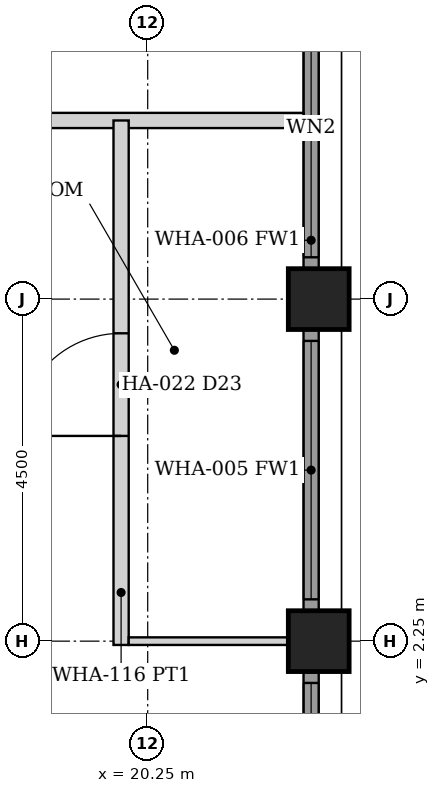
"""IFC4 building model, lengths in metres.
Left out: names, types, materials, properties, quantities, classifications, styles, units other than length and angle.
Written with IfcOpenShell. Run it as: python <this file> out.ifc"""

import sys

from ifc_helpers import new_model, si_unit, direction, frame, frame_2d, origin, origin_2d, place, context, subcontext, project, spatial, rectangle, hollow_rectangle, extrude, element, fill, save


model = new_model("IFC4")
c1 = context("Model", 3, precision=1e-05, world=origin(), true_north=direction((0.0, 1.0)))
c2 = subcontext(c1, "Body", "Model", "MODEL_VIEW")
j1 = project(units=[si_unit("LENGTHUNIT", "METRE"), si_unit("PLANEANGLEUNIT", "RADIAN")], contexts=[c1])
p1 = place(None, origin())
s1 = spatial("IfcSite", under=j1, at=p1, CompositionType="ELEMENT")
p2 = place(p1, origin())
s2 = spatial("IfcBuilding", under=s1, at=p2, CompositionType="ELEMENT")
p3 = place(p2, frame((0.0, 0.0, 118.4)))
s3 = spatial("IfcBuildingStorey", under=s2, at=p3, CompositionType="ELEMENT", Elevation=118.4)
for number, where, z_axis, x_axis in (
    (1, (22.5, 2.25, 0.0), (0.0, 0.0, 1.0), (1.0, 0.0, 0.0)),
    (2, (22.5, 6.75, 0.0), (0.0, 0.0, 1.0), (1.0, 0.0, 0.0)),
):
    element("IfcColumn", number, at=place(p3, frame(where, z_axis=z_axis, x_axis=x_axis)), inside=s3, PredefinedType="COLUMN", context=c2, shape_type="SweptSolid", body=[
        extrude(hollow_rectangle(XDim=0.8, YDim=0.8, WallThickness=0.06, at=origin_2d()), origin(), (0.0, 0.0, 1.0), 3.6),
    ])
p4 = place(p3, frame((22.4, -1.845, 0.0), z_axis=(0.0, 0.0, 1.0), x_axis=(0.0, 1.0, 0.0)))
e3 = element("IfcWall", 3, at=p4, inside=s3, PredefinedType="SOLIDWALL", context=c2, shape_type="SweptSolid", body=[
    extrude(rectangle(XDim=3.69, YDim=0.2, at=frame_2d((1.845, 0.0))), origin(), (0.0, 0.0, 1.0), 2.479),
])
p5 = place(p4, frame((0.145, 0.0, 0.3)))
e4 = element("IfcOpeningElement", 4, at=p5, cuts=e3, PredefinedType="OPENING", context=c2, shape_type="SweptSolid", body=[
    extrude(rectangle(XDim=3.4, YDim=2.029, at=frame_2d((1.7, 1.015))), frame((0.0, 0.11, 0.0), z_axis=(0.0, -1.0, 0.0), x_axis=(1.0, 0.0, 0.0)), (0.0, 0.0, 1.0), 0.22),
])
p6 = place(p3, frame((22.4, 2.655, 0.0), z_axis=(0.0, 0.0, 1.0), x_axis=(0.0, 1.0, 0.0)))
e5 = element("IfcWall", 5, at=p6, inside=s3, PredefinedType="SOLIDWALL", context=c2, shape_type="SweptSolid", body=[
    extrude(rectangle(XDim=3.69, YDim=0.2, at=frame_2d((1.845, 0.0))), origin(), (0.0, 0.0, 1.0), 2.479),
])
p7 = place(p6, frame((0.145, 0.0, 0.3)))
e6 = element("IfcOpeningElement", 6, at=p7, cuts=e5, PredefinedType="OPENING", context=c2, shape_type="SweptSolid", body=[
    extrude(rectangle(XDim=3.4, YDim=2.029, at=frame_2d((1.7, 1.015))), frame((0.0, 0.11, 0.0), z_axis=(0.0, -1.0, 0.0), x_axis=(1.0, 0.0, 0.0)), (0.0, 0.0, 1.0), 0.22),
])
p8 = place(p3, frame((22.4, 7.155, 0.0), z_axis=(0.0, 0.0, 1.0), x_axis=(0.0, 1.0, 0.0)))
e7 = element("IfcWall", 7, at=p8, inside=s3, PredefinedType="SOLIDWALL", context=c2, shape_type="SweptSolid", body=[
    extrude(rectangle(XDim=3.69, YDim=0.2, at=frame_2d((1.845, 0.0))), origin(), (0.0, 0.0, 1.0), 2.479),
])
p9 = place(p8, frame((0.145, 0.0, 0.3)))
e8 = element("IfcOpeningElement", 8, at=p9, cuts=e7, PredefinedType="OPENING", context=c2, shape_type="SweptSolid", body=[
    extrude(rectangle(XDim=3.4, YDim=2.029, at=frame_2d((1.7, 1.015))), frame((0.0, 0.11, 0.0), z_axis=(0.0, -1.0, 0.0), x_axis=(1.0, 0.0, 0.0)), (0.0, 0.0, 1.0), 0.22),
])
p10 = place(p3, frame((-22.3, 9.1, 0.0), z_axis=(0.0, 0.0, 1.0), x_axis=(1.0, 0.0, 0.0)))
e9 = element("IfcWall", 9, at=p10, inside=s3, PredefinedType="PARTITIONING", context=c2, shape_type="SweptSolid", body=[
    extrude(rectangle(XDim=44.6, YDim=0.2, at=frame_2d((22.3, 0.0))), origin(), (0.0, 0.0, 1.0), 2.473),
])
p11 = place(p10, frame((6.75, 0.0, 0.0)))
e10 = element("IfcOpeningElement", 10, at=p11, cuts=e9, PredefinedType="OPENING", context=c2, shape_type="SweptSolid", body=[
    extrude(rectangle(XDim=0.9, YDim=2.1, at=frame_2d((0.45, 1.05))), frame((0.0, 0.11, 0.0), z_axis=(0.0, -1.0, 0.0), x_axis=(1.0, 0.0, 0.0)), (0.0, 0.0, 1.0), 0.22),
])
p12 = place(p10, frame((11.25, 0.0, 0.0)))
e11 = element("IfcOpeningElement", 11, at=p12, cuts=e9, PredefinedType="OPENING", context=c2, shape_type="SweptSolid", body=[
    extrude(rectangle(XDim=0.9, YDim=2.1, at=frame_2d((0.45, 1.05))), frame((0.0, 0.11, 0.0), z_axis=(0.0, -1.0, 0.0), x_axis=(1.0, 0.0, 0.0)), (0.0, 0.0, 1.0), 0.22),
])
p13 = place(p10, frame((15.75, 0.0, 0.0)))
e12 = element("IfcOpeningElement", 12, at=p13, cuts=e9, PredefinedType="OPENING", context=c2, shape_type="SweptSolid", body=[
    extrude(rectangle(XDim=0.9, YDim=2.1, at=frame_2d((0.45, 1.05))), frame((0.0, 0.11, 0.0), z_axis=(0.0, -1.0, 0.0), x_axis=(1.0, 0.0, 0.0)), (0.0, 0.0, 1.0), 0.22),
])
p14 = place(p10, frame((20.25, 0.0, 0.0)))
e13 = element("IfcOpeningElement", 13, at=p14, cuts=e9, PredefinedType="OPENING", context=c2, shape_type="SweptSolid", body=[
    extrude(rectangle(XDim=0.9, YDim=2.1, at=frame_2d((0.45, 1.05))), frame((0.0, 0.11, 0.0), z_axis=(0.0, -1.0, 0.0), x_axis=(1.0, 0.0, 0.0)), (0.0, 0.0, 1.0), 0.22),
])
p15 = place(p10, frame((24.75, 0.0, 0.0)))
e14 = element("IfcOpeningElement", 14, at=p15, cuts=e9, PredefinedType="OPENING", context=c2, shape_type="SweptSolid", body=[
    extrude(rectangle(XDim=0.9, YDim=2.1, at=frame_2d((0.45, 1.05))), frame((0.0, 0.11, 0.0), z_axis=(0.0, -1.0, 0.0), x_axis=(1.0, 0.0, 0.0)), (0.0, 0.0, 1.0), 0.22),
])
p16 = place(p10, frame((29.25, 0.0, 0.0)))
e15 = element("IfcOpeningElement", 15, at=p16, cuts=e9, PredefinedType="OPENING", context=c2, shape_type="SweptSolid", body=[
    extrude(rectangle(XDim=0.9, YDim=2.1, at=frame_2d((0.45, 1.05))), frame((0.0, 0.11, 0.0), z_axis=(0.0, -1.0, 0.0), x_axis=(1.0, 0.0, 0.0)), (0.0, 0.0, 1.0), 0.22),
])
p17 = place(p10, frame((33.75, 0.0, 0.0)))
e16 = element("IfcOpeningElement", 16, at=p17, cuts=e9, PredefinedType="OPENING", context=c2, shape_type="SweptSolid", body=[
    extrude(rectangle(XDim=0.9, YDim=2.1, at=frame_2d((0.45, 1.05))), frame((0.0, 0.11, 0.0), z_axis=(0.0, -1.0, 0.0), x_axis=(1.0, 0.0, 0.0)), (0.0, 0.0, 1.0), 0.22),
])
p18 = place(p10, frame((38.85, 0.0, 0.0)))
e17 = element("IfcOpeningElement", 17, at=p18, cuts=e9, PredefinedType="OPENING", context=c2, shape_type="SweptSolid", body=[
    extrude(rectangle(XDim=0.9, YDim=2.1, at=frame_2d((0.45, 1.05))), frame((0.0, 0.11, 0.0), z_axis=(0.0, -1.0, 0.0), x_axis=(1.0, 0.0, 0.0)), (0.0, 0.0, 1.0), 0.22),
])
p19 = place(p10, frame((4.85, 0.0, 0.0)))
e18 = element("IfcOpeningElement", 18, at=p19, cuts=e9, PredefinedType="OPENING", context=c2, shape_type="SweptSolid", body=[
    extrude(rectangle(XDim=0.9, YDim=2.1, at=frame_2d((0.45, 1.05))), frame((0.0, 0.11, 0.0), z_axis=(0.0, -1.0, 0.0), x_axis=(1.0, 0.0, 0.0)), (0.0, 0.0, 1.0), 0.22),
])
p20 = place(p3, frame((19.9, 2.2, 0.0), z_axis=(0.0, 0.0, 1.0), x_axis=(0.0, 1.0, 0.0)))
e19 = element("IfcWall", 19, at=p20, inside=s3, PredefinedType="PARTITIONING", context=c2, shape_type="SweptSolid", body=[
    extrude(rectangle(XDim=6.9, YDim=0.2, at=frame_2d((3.45, 0.0))), origin(), (0.0, 0.0, 1.0), 2.473),
])
p21 = place(p20, frame((2.75, 0.0, 0.0)))
e20 = element("IfcOpeningElement", 20, at=p21, cuts=e19, PredefinedType="OPENING", context=c2, shape_type="SweptSolid", body=[
    extrude(rectangle(XDim=1.35, YDim=2.1, at=frame_2d((0.675, 1.05))), frame((0.0, 0.11, 0.0), z_axis=(0.0, -1.0, 0.0), x_axis=(1.0, 0.0, 0.0)), (0.0, 0.0, 1.0), 0.22),
])
p22 = place(p3, frame((20.0, 2.25, 0.0), z_axis=(0.0, 0.0, 1.0), x_axis=(1.0, 0.0, 0.0)))
e21 = element("IfcWall", 21, at=p22, inside=s3, PredefinedType="PARTITIONING", context=c2, shape_type="SweptSolid", body=[
    extrude(rectangle(XDim=2.1, YDim=0.1, at=frame_2d((1.05, 0.0))), origin(), (0.0, 0.0, 1.0), 2.473),
])
p23 = place(p5, origin())
e22 = element("IfcWindow", 22, at=p23, inside=s3, PartitioningType="SINGLE_PANEL", PredefinedType="WINDOW", context=c2, shape_type="SweptSolid", body=[
    extrude(rectangle(XDim=3.4, YDim=2.029, at=frame_2d((1.7, 1.015))), frame((0.0, 0.03, 0.0), z_axis=(0.0, -1.0, 0.0), x_axis=(1.0, 0.0, 0.0)), (0.0, 0.0, 1.0), 0.06),
])
fill(e4, e22)
p24 = place(p7, origin())
e23 = element("IfcWindow", 23, at=p24, inside=s3, PartitioningType="SINGLE_PANEL", PredefinedType="WINDOW", context=c2, shape_type="SweptSolid", body=[
    extrude(rectangle(XDim=3.4, YDim=2.029, at=frame_2d((1.7, 1.015))), frame((0.0, 0.03, 0.0), z_axis=(0.0, -1.0, 0.0), x_axis=(1.0, 0.0, 0.0)), (0.0, 0.0, 1.0), 0.06),
])
fill(e6, e23)
p25 = place(p9, origin())
e24 = element("IfcWindow", 24, at=p25, inside=s3, PartitioningType="SINGLE_PANEL", PredefinedType="WINDOW", context=c2, shape_type="SweptSolid", body=[
    extrude(rectangle(XDim=3.4, YDim=2.029, at=frame_2d((1.7, 1.015))), frame((0.0, 0.03, 0.0), z_axis=(0.0, -1.0, 0.0), x_axis=(1.0, 0.0, 0.0)), (0.0, 0.0, 1.0), 0.06),
])
fill(e8, e24)
p26 = place(p21, origin())
e25 = element("IfcDoor", 25, at=p26, inside=s3, OperationType="SINGLE_SWING_LEFT", PredefinedType="DOOR", context=c2, shape_type="SweptSolid", body=[
    extrude(rectangle(XDim=1.35, YDim=2.1, at=frame_2d((0.675, 1.05))), frame((0.0, 0.025, 0.0), z_axis=(0.0, -1.0, 0.0), x_axis=(1.0, 0.0, 0.0)), (0.0, 0.0, 1.0), 0.05),
])
fill(e20, e25)
save(model, sys.argv[1])
